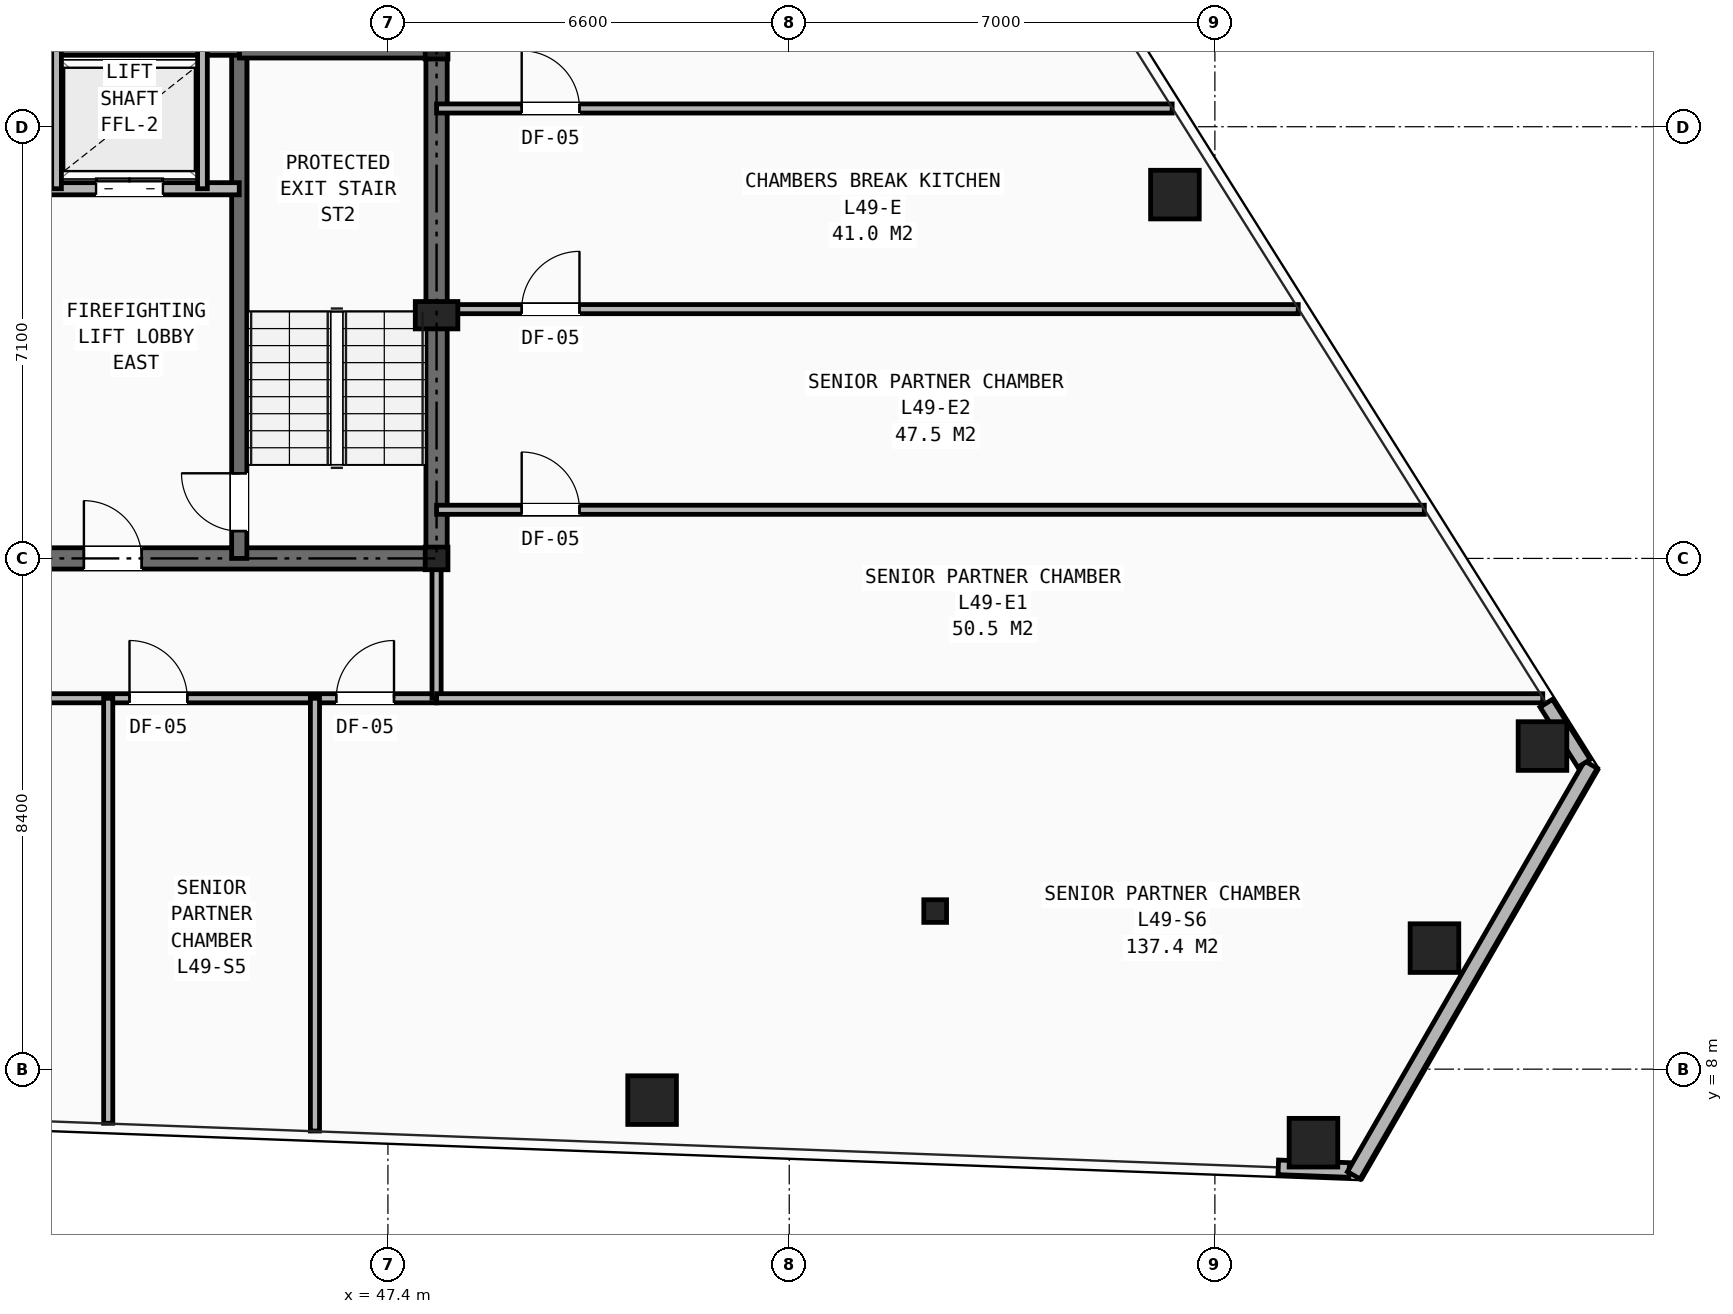
"""IFC4 building model, lengths in metres.
Left out: names, types, materials, properties, quantities, classifications, styles, units other than length and angle.
Written with IfcOpenShell. Run it as: python <this file> out.ifc"""

import sys

from ifc_helpers import new_model, si_unit, direction, frame, frame_2d, origin, origin_2d, place, context, subcontext, project, spatial, rectangle, hollow_rectangle, i_section, extrude, element, fill, save


model = new_model("IFC4")
c1 = context("Model", 3, precision=1e-05, world=origin(), true_north=direction((0.0, 1.0)))
c2 = subcontext(c1, "Body", "Model", "MODEL_VIEW")
j1 = project(units=[si_unit("LENGTHUNIT", "METRE"), si_unit("PLANEANGLEUNIT", "RADIAN")], contexts=[c1])
p1 = place(None, origin())
s1 = spatial("IfcSite", under=j1, at=p1, CompositionType="ELEMENT")
p2 = place(p1, origin())
s2 = spatial("IfcBuilding", under=s1, at=p2, CompositionType="ELEMENT")
p3 = place(p2, frame((0.0, 0.0, 172.35)))
s3 = spatial("IfcBuildingStorey", under=s2, at=p3, CompositionType="ELEMENT", Elevation=172.35)
for number, where, z_axis, x_axis in (
    (1, (48.2, 16.4, 0.0), (0.0, 0.0, 1.0), (1.0, 0.0, 0.0)),
    (2, (48.2, 24.8, 0.0), (0.0, 0.0, 1.0), (1.0, 0.0, 0.0)),
    (3, (56.4, 10.6, 0.0), (0.0, 0.0, 1.0), (1.0, 0.0, 0.0)),
):
    element("IfcColumn", number, at=place(p3, frame(where, z_axis=z_axis, x_axis=x_axis)), inside=s3, PredefinedType="COLUMN", context=c2, shape_type="SweptSolid", body=[
        extrude(i_section(OverallWidth=0.374, OverallDepth=0.372, WebThickness=0.016, FlangeThickness=0.026, at=origin_2d()), origin(), (0.0, 0.0, 1.0), 3.45),
    ])
p4 = place(p3, frame((48.2, 20.4, 0.0), z_axis=(0.0, 0.0, 1.0), x_axis=(1.0, 0.0, 0.0)))
e4 = element("IfcColumn", 4, at=p4, inside=s3, PredefinedType="PILASTER", context=c2, shape_type="SweptSolid", body=[
    extrude(rectangle(XDim=0.7, YDim=0.45, at=origin_2d()), origin(), (0.0, 0.0, 1.0), 3.45),
])
for number, where, z_axis, x_axis in (
    (5, (51.744, 7.491, 0.0), (0.0, 0.0, 1.0), (1.0, 0.0, 0.0)),
    (6, (62.621, 6.791, 0.0), (0.0, 0.0, 1.0), (1.0, 0.0, 0.0)),
    (7, (64.611, 9.991, 0.0), (0.0, 0.0, 1.0), (1.0, 0.0, 0.0)),
    (8, (66.388, 13.314, 0.0), (0.0, 0.0, 1.0), (1.0, 0.0, 0.0)),
    (9, (60.343, 22.384, 0.0), (0.0, 0.0, 1.0), (1.0, 0.0, 0.0)),
):
    element("IfcColumn", number, at=place(p3, frame(where, z_axis=z_axis, x_axis=x_axis)), inside=s3, PredefinedType="COLUMN", context=c2, shape_type="SweptSolid", body=[
        extrude(hollow_rectangle(XDim=0.8, YDim=0.8, WallThickness=0.055, at=origin_2d()), origin(), (0.0, 0.0, 1.0), 3.45),
    ])
p5 = place(p3, frame((62.042, 6.385, 0.0), z_axis=(0.0, 0.0, 1.0), x_axis=(0.999299278667, -0.037429288739, 0.0)))
e10 = element("IfcWall", 10, at=p5, inside=s3, PredefinedType="SHEAR", context=c2, shape_type="SweptSolid", body=[
    extrude(rectangle(XDim=1.167, YDim=0.24, at=frame_2d((0.584, 0.0))), origin(), (0.0, 0.0, 1.0), 2.583),
])
p6 = place(p3, frame((67.185, 13.008, 0.0), z_axis=(0.0, 0.0, 1.0), x_axis=(-0.500020487837, -0.866013574803, 0.0)))
e11 = element("IfcWall", 11, at=p6, inside=s3, PredefinedType="SHEAR", context=c2, shape_type="SweptSolid", body=[
    extrude(rectangle(XDim=7.8, YDim=0.24, at=frame_2d((3.9, 0.0))), origin(), (0.0, 0.0, 1.0), 2.583),
])
p7 = place(p3, frame((67.071, 13.03, 0.0), z_axis=(0.0, 0.0, 1.0), x_axis=(-0.532008789028, 0.84673883128, 0.0)))
e12 = element("IfcWall", 12, at=p7, inside=s3, PredefinedType="SHEAR", context=c2, shape_type="SweptSolid", body=[
    extrude(rectangle(XDim=1.167, YDim=0.24, at=frame_2d((0.584, 0.0))), origin(), (0.0, 0.0, 1.0), 2.583),
])
p8 = place(p3, frame((31.8, 16.4, 0.0), z_axis=(0.0, 0.0, 1.0), x_axis=(1.0, 0.0, 0.0)))
e13 = element("IfcWall", 13, at=p8, inside=s3, PredefinedType="SHEAR", context=c2, shape_type="SweptSolid", body=[
    extrude(rectangle(XDim=16.4, YDim=0.35, at=frame_2d((8.2, 0.0))), origin(), (0.0, 0.0, 1.0), 3.21),
])
p9 = place(p8, frame((7.75, 0.0, 0.0)))
e14 = element("IfcOpeningElement", 14, at=p9, cuts=e13, PredefinedType="OPENING", context=c2, shape_type="SweptSolid", body=[
    extrude(rectangle(XDim=0.9, YDim=2.1, at=frame_2d((0.45, 1.05))), frame((0.0, 0.185, 0.0), z_axis=(0.0, -1.0, 0.0), x_axis=(1.0, 0.0, 0.0)), (0.0, 0.0, 1.0), 0.37),
])
p10 = place(p8, frame((4.2, 0.0, 0.0)))
e15 = element("IfcOpeningElement", 15, at=p10, cuts=e13, PredefinedType="OPENING", context=c2, shape_type="SweptSolid", body=[
    extrude(rectangle(XDim=0.95, YDim=2.1, at=frame_2d((0.475, 1.05))), frame((0.0, 0.185, 0.0), z_axis=(0.0, -1.0, 0.0), x_axis=(1.0, 0.0, 0.0)), (0.0, 0.0, 1.0), 0.37),
])
p11 = place(p8, frame((10.6, 0.0, 0.0)))
e16 = element("IfcOpeningElement", 16, at=p11, cuts=e13, PredefinedType="OPENING", context=c2, shape_type="SweptSolid", body=[
    extrude(rectangle(XDim=0.95, YDim=2.1, at=frame_2d((0.475, 1.05))), frame((0.0, 0.185, 0.0), z_axis=(0.0, -1.0, 0.0), x_axis=(1.0, 0.0, 0.0)), (0.0, 0.0, 1.0), 0.37),
])
p12 = place(p3, frame((48.2, 16.4, 0.0), z_axis=(0.0, 0.0, 1.0), x_axis=(0.0, 1.0, 0.0)))
e17 = element("IfcWall", 17, at=p12, inside=s3, PredefinedType="SHEAR", context=c2, shape_type="SweptSolid", body=[
    extrude(rectangle(XDim=14.8, YDim=0.35, at=frame_2d((7.4, 0.0))), origin(), (0.0, 0.0, 1.0), 3.21),
])
p13 = place(p12, frame((11.0, 0.0, 0.0)))
e18 = element("IfcOpeningElement", 18, at=p13, cuts=e17, PredefinedType="OPENING", context=c2, shape_type="SweptSolid", body=[
    extrude(rectangle(XDim=1.1, YDim=2.15, at=frame_2d((0.55, 1.075))), frame((0.0, 0.185, 0.0), z_axis=(0.0, -1.0, 0.0), x_axis=(1.0, 0.0, 0.0)), (0.0, 0.0, 1.0), 0.37),
])
p14 = place(p3, frame((44.955, 16.4, 0.0), z_axis=(0.0, 0.0, 1.0), x_axis=(0.0, 1.0, 0.0)))
e19 = element("IfcWall", 19, at=p14, inside=s3, PredefinedType="SHEAR", context=c2, shape_type="SweptSolid", body=[
    extrude(rectangle(XDim=8.4, YDim=0.25, at=frame_2d((4.2, 0.0))), origin(), (0.0, 0.0, 1.0), 3.21),
])
p15 = place(p14, frame((0.45, 0.0, 0.0)))
e20 = element("IfcOpeningElement", 20, at=p15, cuts=e19, PredefinedType="OPENING", context=c2, shape_type="SweptSolid", body=[
    extrude(rectangle(XDim=0.95, YDim=2.1, at=frame_2d((0.475, 1.05))), frame((0.0, 0.135, 0.0), z_axis=(0.0, -1.0, 0.0), x_axis=(1.0, 0.0, 0.0)), (0.0, 0.0, 1.0), 0.27),
])
p16 = place(p3, frame((44.955, 24.755, 0.0), z_axis=(0.0, 0.0, 1.0), x_axis=(1.0, 0.0, 0.0)))
e21 = element("IfcWall", 21, at=p16, inside=s3, PredefinedType="SHEAR", context=c2, shape_type="SweptSolid", body=[
    extrude(rectangle(XDim=3.245, YDim=0.25, at=frame_2d((1.623, 0.0))), origin(), (0.0, 0.0, 1.0), 3.21),
])
p17 = place(p3, frame((35.045, 24.8, 0.0), z_axis=(0.0, 0.0, 1.0), x_axis=(1.0, 0.0, 0.0)))
e22 = element("IfcWall", 22, at=p17, inside=s3, PredefinedType="SHEAR", context=c2, shape_type="SweptSolid", body=[
    extrude(rectangle(XDim=9.91, YDim=0.25, at=frame_2d((4.955, 0.0))), origin(), (0.0, 0.0, 1.0), 3.21),
])
p18 = place(p3, frame((35.045, 22.48, 0.0), z_axis=(0.0, 0.0, 1.0), x_axis=(1.0, 0.0, 0.0)))
e23 = element("IfcWall", 23, at=p18, inside=s3, PredefinedType="SOLIDWALL", context=c2, shape_type="SweptSolid", body=[
    extrude(rectangle(XDim=9.91, YDim=0.2, at=frame_2d((4.955, 0.0))), origin(), (0.0, 0.0, 1.0), 3.21),
])
p19 = place(p18, frame((1.255, 0.0, 0.0)))
e24 = element("IfcOpeningElement", 24, at=p19, cuts=e23, PredefinedType="OPENING", context=c2, shape_type="SweptSolid", body=[
    extrude(rectangle(XDim=1.1, YDim=2.15, at=frame_2d((0.55, 1.075))), frame((0.0, 0.11, 0.0), z_axis=(0.0, -1.0, 0.0), x_axis=(1.0, 0.0, 0.0)), (0.0, 0.0, 1.0), 0.22),
])
p20 = place(p18, frame((7.555, 0.0, 0.0)))
e25 = element("IfcOpeningElement", 25, at=p20, cuts=e23, PredefinedType="OPENING", context=c2, shape_type="SweptSolid", body=[
    extrude(rectangle(XDim=1.1, YDim=2.15, at=frame_2d((0.55, 1.075))), frame((0.0, 0.11, 0.0), z_axis=(0.0, -1.0, 0.0), x_axis=(1.0, 0.0, 0.0)), (0.0, 0.0, 1.0), 0.22),
])
p21 = place(p18, frame((4.405, 0.0, 0.0)))
e26 = element("IfcOpeningElement", 26, at=p21, cuts=e23, PredefinedType="OPENING", context=c2, shape_type="SweptSolid", body=[
    extrude(rectangle(XDim=1.1, YDim=2.15, at=frame_2d((0.55, 1.075))), frame((0.0, 0.11, 0.0), z_axis=(0.0, -1.0, 0.0), x_axis=(1.0, 0.0, 0.0)), (0.0, 0.0, 1.0), 0.22),
])
for number, where, z_axis, x_axis in (
    (27, (41.95, 22.48, 0.0), (0.0, 0.0, 1.0), (0.0, 1.0, 0.0)),
    (28, (44.35, 22.48, 0.0), (0.0, 0.0, 1.0), (0.0, 1.0, 0.0)),
):
    element("IfcWall", number, at=place(p3, frame(where, z_axis=z_axis, x_axis=x_axis)), inside=s3, PredefinedType="SOLIDWALL", context=c2, shape_type="SweptSolid", body=[
        extrude(rectangle(XDim=2.32, YDim=0.16, at=frame_2d((1.16, 0.0))), origin(), (0.0, 0.0, 1.0), 3.21),
    ])
p22 = place(p3, frame((29.6, 14.1, 0.0), z_axis=(0.0, 0.0, 1.0), x_axis=(1.0, 0.0, 0.0)))
e29 = element("IfcWall", 29, at=p22, inside=s3, PredefinedType="PARTITIONING", context=c2, shape_type="SweptSolid", body=[
    extrude(rectangle(XDim=18.6, YDim=0.15, at=frame_2d((9.3, 0.0))), origin(), (0.0, 0.0, 1.0), 2.252),
])
p23 = place(p22, frame((0.55, 0.0, 0.0)))
e30 = element("IfcOpeningElement", 30, at=p23, cuts=e29, PredefinedType="OPENING", context=c2, shape_type="SweptSolid", body=[
    extrude(rectangle(XDim=0.95, YDim=2.1, at=frame_2d((0.475, 1.05))), frame((0.0, 0.085, 0.0), z_axis=(0.0, -1.0, 0.0), x_axis=(1.0, 0.0, 0.0)), (0.0, 0.0, 1.0), 0.17),
])
p24 = place(p22, frame((2.25, 0.0, 0.0)))
e31 = element("IfcOpeningElement", 31, at=p24, cuts=e29, PredefinedType="OPENING", context=c2, shape_type="SweptSolid", body=[
    extrude(rectangle(XDim=0.95, YDim=2.1, at=frame_2d((0.475, 1.05))), frame((0.0, 0.085, 0.0), z_axis=(0.0, -1.0, 0.0), x_axis=(1.0, 0.0, 0.0)), (0.0, 0.0, 1.0), 0.17),
])
p25 = place(p22, frame((5.95, 0.0, 0.0)))
e32 = element("IfcOpeningElement", 32, at=p25, cuts=e29, PredefinedType="OPENING", context=c2, shape_type="SweptSolid", body=[
    extrude(rectangle(XDim=0.95, YDim=2.1, at=frame_2d((0.475, 1.05))), frame((0.0, 0.085, 0.0), z_axis=(0.0, -1.0, 0.0), x_axis=(1.0, 0.0, 0.0)), (0.0, 0.0, 1.0), 0.17),
])
p26 = place(p22, frame((9.75, 0.0, 0.0)))
e33 = element("IfcOpeningElement", 33, at=p26, cuts=e29, PredefinedType="OPENING", context=c2, shape_type="SweptSolid", body=[
    extrude(rectangle(XDim=0.95, YDim=2.1, at=frame_2d((0.475, 1.05))), frame((0.0, 0.085, 0.0), z_axis=(0.0, -1.0, 0.0), x_axis=(1.0, 0.0, 0.0)), (0.0, 0.0, 1.0), 0.17),
])
p27 = place(p22, frame((13.55, 0.0, 0.0)))
e34 = element("IfcOpeningElement", 34, at=p27, cuts=e29, PredefinedType="OPENING", context=c2, shape_type="SweptSolid", body=[
    extrude(rectangle(XDim=0.95, YDim=2.1, at=frame_2d((0.475, 1.05))), frame((0.0, 0.085, 0.0), z_axis=(0.0, -1.0, 0.0), x_axis=(1.0, 0.0, 0.0)), (0.0, 0.0, 1.0), 0.17),
])
p28 = place(p22, frame((16.95, 0.0, 0.0)))
e35 = element("IfcOpeningElement", 35, at=p28, cuts=e29, PredefinedType="OPENING", context=c2, shape_type="SweptSolid", body=[
    extrude(rectangle(XDim=0.95, YDim=2.1, at=frame_2d((0.475, 1.05))), frame((0.0, 0.085, 0.0), z_axis=(0.0, -1.0, 0.0), x_axis=(1.0, 0.0, 0.0)), (0.0, 0.0, 1.0), 0.17),
])
p29 = place(p3, frame((48.2, 14.1, 0.0), z_axis=(0.0, 0.0, 1.0), x_axis=(0.0, 1.0, 0.0)))
e36 = element("IfcWall", 36, at=p29, inside=s3, PredefinedType="PARTITIONING", context=c2, shape_type="SweptSolid", body=[
    extrude(rectangle(XDim=2.3, YDim=0.15, at=frame_2d((1.15, 0.0))), origin(), (0.0, 0.0, 1.0), 2.665),
])
p30 = place(p3, frame((42.8, 7.11, 0.0), z_axis=(0.0, 0.0, 1.0), x_axis=(0.0, 1.0, 0.0)))
e37 = element("IfcWall", 37, at=p30, inside=s3, PredefinedType="PARTITIONING", context=c2, shape_type="SweptSolid", body=[
    extrude(rectangle(XDim=6.99, YDim=0.15, at=frame_2d((3.495, 0.0))), origin(), (0.0, 0.0, 1.0), 2.589),
])
p31 = place(p3, frame((46.2, 6.983, 0.0), z_axis=(0.0, 0.0, 1.0), x_axis=(0.0, 1.0, 0.0)))
e38 = element("IfcWall", 38, at=p31, inside=s3, PredefinedType="PARTITIONING", context=c2, shape_type="SweptSolid", body=[
    extrude(rectangle(XDim=7.117, YDim=0.15, at=frame_2d((3.559, 0.0))), origin(), (0.0, 0.0, 1.0), 2.589),
])
p32 = place(p3, frame((48.2, 14.1, 0.0), z_axis=(0.0, 0.0, 1.0), x_axis=(1.0, 0.0, 0.0)))
e39 = element("IfcWall", 39, at=p32, inside=s3, PredefinedType="PARTITIONING", context=c2, shape_type="SweptSolid", body=[
    extrude(rectangle(XDim=18.192, YDim=0.15, at=frame_2d((9.096, 0.0))), origin(), (0.0, 0.0, 1.0), 2.589),
])
p33 = place(p3, frame((48.2, 17.2, 0.0), z_axis=(0.0, 0.0, 1.0), x_axis=(1.0, 0.0, 0.0)))
e40 = element("IfcWall", 40, at=p33, inside=s3, PredefinedType="PARTITIONING", context=c2, shape_type="SweptSolid", body=[
    extrude(rectangle(XDim=16.244, YDim=0.15, at=frame_2d((8.122, 0.0))), origin(), (0.0, 0.0, 1.0), 2.589),
])
p34 = place(p33, frame((1.4, 0.0, 0.0)))
e41 = element("IfcOpeningElement", 41, at=p34, cuts=e40, PredefinedType="OPENING", context=c2, shape_type="SweptSolid", body=[
    extrude(rectangle(XDim=0.95, YDim=2.1, at=frame_2d((0.475, 1.05))), frame((0.0, 0.085, 0.0), z_axis=(0.0, -1.0, 0.0), x_axis=(1.0, 0.0, 0.0)), (0.0, 0.0, 1.0), 0.17),
])
p35 = place(p3, frame((48.2, 20.5, 0.0), z_axis=(0.0, 0.0, 1.0), x_axis=(1.0, 0.0, 0.0)))
e42 = element("IfcWall", 42, at=p35, inside=s3, PredefinedType="PARTITIONING", context=c2, shape_type="SweptSolid", body=[
    extrude(rectangle(XDim=14.171, YDim=0.15, at=frame_2d((7.085, 0.0))), origin(), (0.0, 0.0, 1.0), 2.589),
])
p36 = place(p35, frame((1.4, 0.0, 0.0)))
e43 = element("IfcOpeningElement", 43, at=p36, cuts=e42, PredefinedType="OPENING", context=c2, shape_type="SweptSolid", body=[
    extrude(rectangle(XDim=0.95, YDim=2.1, at=frame_2d((0.475, 1.05))), frame((0.0, 0.085, 0.0), z_axis=(0.0, -1.0, 0.0), x_axis=(1.0, 0.0, 0.0)), (0.0, 0.0, 1.0), 0.17),
])
p37 = place(p3, frame((48.2, 23.8, 0.0), z_axis=(0.0, 0.0, 1.0), x_axis=(1.0, 0.0, 0.0)))
e44 = element("IfcWall", 44, at=p37, inside=s3, PredefinedType="PARTITIONING", context=c2, shape_type="SweptSolid", body=[
    extrude(rectangle(XDim=12.097, YDim=0.15, at=frame_2d((6.049, 0.0))), origin(), (0.0, 0.0, 1.0), 2.589),
])
p38 = place(p37, frame((1.4, 0.0, 0.0)))
e45 = element("IfcOpeningElement", 45, at=p38, cuts=e44, PredefinedType="OPENING", context=c2, shape_type="SweptSolid", body=[
    extrude(rectangle(XDim=0.95, YDim=2.1, at=frame_2d((0.475, 1.05))), frame((0.0, 0.085, 0.0), z_axis=(0.0, -1.0, 0.0), x_axis=(1.0, 0.0, 0.0)), (0.0, 0.0, 1.0), 0.17),
])
p39 = place(p15, origin())
e46 = element("IfcDoor", 46, at=p39, inside=s3, OperationType="SINGLE_SWING_RIGHT", PredefinedType="DOOR", context=c2, shape_type="SweptSolid", body=[
    extrude(rectangle(XDim=0.95, YDim=2.1, at=frame_2d((0.475, 1.05))), frame((0.0, 0.025, 0.0), z_axis=(0.0, -1.0, 0.0), x_axis=(1.0, 0.0, 0.0)), (0.0, 0.0, 1.0), 0.05),
])
fill(e20, e46)
p40 = place(p11, origin())
e47 = element("IfcDoor", 47, at=p40, inside=s3, OperationType="SINGLE_SWING_LEFT", PredefinedType="DOOR", context=c2, shape_type="SweptSolid", body=[
    extrude(rectangle(XDim=0.95, YDim=2.1, at=frame_2d((0.475, 1.05))), frame((0.0, 0.025, 0.0), z_axis=(0.0, -1.0, 0.0), x_axis=(1.0, 0.0, 0.0)), (0.0, 0.0, 1.0), 0.05),
])
fill(e16, e47)
p41 = place(p20, origin())
e48 = element("IfcDoor", 48, at=p41, inside=s3, OperationType="DOUBLE_DOOR_SLIDING", PredefinedType="DOOR", context=c2, shape_type="SweptSolid", body=[
    extrude(rectangle(XDim=1.1, YDim=2.15, at=frame_2d((0.55, 1.075))), frame((0.0, 0.025, 0.0), z_axis=(0.0, -1.0, 0.0), x_axis=(1.0, 0.0, 0.0)), (0.0, 0.0, 1.0), 0.05),
])
fill(e25, e48)
p42 = place(p27, origin())
e49 = element("IfcDoor", 49, at=p42, inside=s3, OperationType="SINGLE_SWING_LEFT", PredefinedType="DOOR", context=c2, shape_type="SweptSolid", body=[
    extrude(rectangle(XDim=0.95, YDim=2.1, at=frame_2d((0.475, 1.05))), frame((0.0, 0.025, 0.0), z_axis=(0.0, -1.0, 0.0), x_axis=(1.0, 0.0, 0.0)), (0.0, 0.0, 1.0), 0.05),
])
fill(e34, e49)
p43 = place(p28, origin())
e50 = element("IfcDoor", 50, at=p43, inside=s3, OperationType="SINGLE_SWING_RIGHT", PredefinedType="DOOR", context=c2, shape_type="SweptSolid", body=[
    extrude(rectangle(XDim=0.95, YDim=2.1, at=frame_2d((0.475, 1.05))), frame((0.0, 0.025, 0.0), z_axis=(0.0, -1.0, 0.0), x_axis=(1.0, 0.0, 0.0)), (0.0, 0.0, 1.0), 0.05),
])
fill(e35, e50)
p44 = place(p34, origin())
e51 = element("IfcDoor", 51, at=p44, inside=s3, OperationType="SINGLE_SWING_LEFT", PredefinedType="DOOR", context=c2, shape_type="SweptSolid", body=[
    extrude(rectangle(XDim=0.95, YDim=2.1, at=frame_2d((0.475, 1.05))), frame((0.0, 0.025, 0.0), z_axis=(0.0, -1.0, 0.0), x_axis=(1.0, 0.0, 0.0)), (0.0, 0.0, 1.0), 0.05),
])
fill(e41, e51)
p45 = place(p36, origin())
e52 = element("IfcDoor", 52, at=p45, inside=s3, OperationType="SINGLE_SWING_RIGHT", PredefinedType="DOOR", context=c2, shape_type="SweptSolid", body=[
    extrude(rectangle(XDim=0.95, YDim=2.1, at=frame_2d((0.475, 1.05))), frame((0.0, 0.025, 0.0), z_axis=(0.0, -1.0, 0.0), x_axis=(1.0, 0.0, 0.0)), (0.0, 0.0, 1.0), 0.05),
])
fill(e43, e52)
p46 = place(p38, origin())
e53 = element("IfcDoor", 53, at=p46, inside=s3, OperationType="SINGLE_SWING_LEFT", PredefinedType="DOOR", context=c2, shape_type="SweptSolid", body=[
    extrude(rectangle(XDim=0.95, YDim=2.1, at=frame_2d((0.475, 1.05))), frame((0.0, 0.025, 0.0), z_axis=(0.0, -1.0, 0.0), x_axis=(1.0, 0.0, 0.0)), (0.0, 0.0, 1.0), 0.05),
])
fill(e45, e53)
save(model, sys.argv[1])
